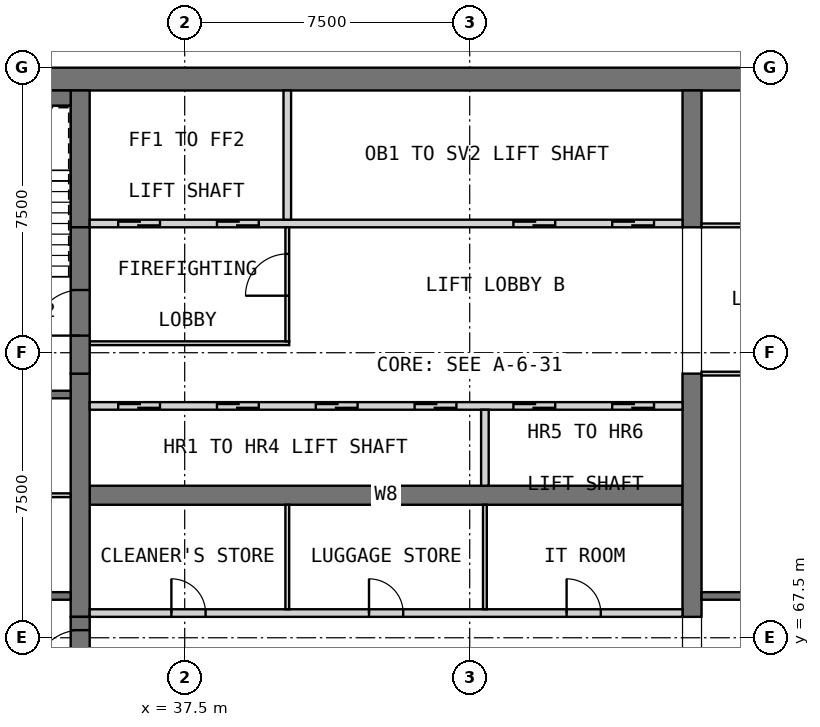
"""IFC4 building model, lengths in metres.
Left out: names, types, materials, properties, quantities, classifications, styles, units other than length and angle.
Written with IfcOpenShell. Run it as: python <this file> out.ifc"""

import sys

from ifc_helpers import new_model, si_unit, direction, frame, frame_2d, origin, place, context, subcontext, project, spatial, rectangle, extrude, element, fill, save


model = new_model("IFC4")
c1 = context("Model", 3, precision=1e-05, world=origin(), true_north=direction((0.0, 1.0)))
c2 = subcontext(c1, "Body", "Model", "MODEL_VIEW")
j1 = project(units=[si_unit("LENGTHUNIT", "METRE"), si_unit("PLANEANGLEUNIT", "RADIAN")], contexts=[c1])
p1 = place(None, origin())
s1 = spatial("IfcSite", under=j1, at=p1, CompositionType="ELEMENT")
p2 = place(p1, origin())
s2 = spatial("IfcBuilding", under=s1, at=p2, CompositionType="ELEMENT")
p3 = place(p2, frame((0.0, 0.0, 226.7)))
s3 = spatial("IfcBuildingStorey", under=s2, at=p3, CompositionType="ELEMENT", Elevation=226.7)
p4 = place(p3, frame((30.0, 82.2, 0.0), z_axis=(0.0, 0.0, 1.0), x_axis=(1.0, 0.0, 0.0)))
e1 = element("IfcWall", 1, at=p4, inside=s3, PredefinedType="SHEAR", context=c2, shape_type="SweptSolid", body=[
    extrude(rectangle(XDim=30.0, YDim=0.6, at=frame_2d((15.0, 0.0))), origin(), (0.0, 0.0, 1.0), 3.5),
])
p5 = place(p3, frame((35.0, 71.25, 0.0), z_axis=(0.0, 0.0, 1.0), x_axis=(1.0, 0.0, 0.0)))
e2 = element("IfcWall", 2, at=p5, inside=s3, PredefinedType="SHEAR", context=c2, shape_type="SweptSolid", body=[
    extrude(rectangle(XDim=15.6, YDim=0.5, at=frame_2d((7.8, 0.0))), origin(), (0.0, 0.0, 1.0), 3.5),
])
p6 = place(p3, frame((34.75, 68.05, 0.0), z_axis=(0.0, 0.0, 1.0), x_axis=(0.0, 1.0, 0.0)))
e3 = element("IfcWall", 3, at=p6, inside=s3, PredefinedType="SHEAR", context=c2, shape_type="SweptSolid", body=[
    extrude(rectangle(XDim=6.4, YDim=0.5, at=frame_2d((3.2, 0.0))), origin(), (0.0, 0.0, 1.0), 3.5),
])
p7 = place(p3, frame((34.75, 78.3, 0.0), z_axis=(0.0, 0.0, 1.0), x_axis=(0.0, 1.0, 0.0)))
e4 = element("IfcWall", 4, at=p7, inside=s3, PredefinedType="SHEAR", context=c2, shape_type="SweptSolid", body=[
    extrude(rectangle(XDim=3.6, YDim=0.5, at=frame_2d((1.8, 0.0))), origin(), (0.0, 0.0, 1.0), 3.5),
])
p8 = place(p3, frame((50.85, 68.05, 0.0), z_axis=(0.0, 0.0, 1.0), x_axis=(0.0, 1.0, 0.0)))
e5 = element("IfcWall", 5, at=p8, inside=s3, PredefinedType="SHEAR", context=c2, shape_type="SweptSolid", body=[
    extrude(rectangle(XDim=6.4, YDim=0.5, at=frame_2d((3.2, 0.0))), origin(), (0.0, 0.0, 1.0), 3.5),
])
p9 = place(p3, frame((50.85, 78.3, 0.0), z_axis=(0.0, 0.0, 1.0), x_axis=(0.0, 1.0, 0.0)))
e6 = element("IfcWall", 6, at=p9, inside=s3, PredefinedType="SHEAR", context=c2, shape_type="SweptSolid", body=[
    extrude(rectangle(XDim=3.6, YDim=0.5, at=frame_2d((1.8, 0.0))), origin(), (0.0, 0.0, 1.0), 3.5),
])
p10 = place(p3, frame((35.0, 68.15, 0.0), z_axis=(0.0, 0.0, 1.0), x_axis=(1.0, 0.0, 0.0)))
e7 = element("IfcWall", 7, at=p10, inside=s3, PredefinedType="PARTITIONING", context=c2, shape_type="SweptSolid", body=[
    extrude(rectangle(XDim=15.6, YDim=0.2, at=frame_2d((7.8, 0.0))), origin(), (0.0, 0.0, 1.0), 3.25),
])
p11 = place(p10, frame((2.15, 0.0, 0.0)))
e8 = element("IfcOpeningElement", 8, at=p11, cuts=e7, PredefinedType="OPENING", context=c2, shape_type="SweptSolid", body=[
    extrude(rectangle(XDim=0.9, YDim=2.1, at=frame_2d((0.45, 1.05))), frame((0.0, 0.11, 0.0), z_axis=(0.0, -1.0, 0.0), x_axis=(1.0, 0.0, 0.0)), (0.0, 0.0, 1.0), 0.22),
])
p12 = place(p10, frame((7.35, 0.0, 0.0)))
e9 = element("IfcOpeningElement", 9, at=p12, cuts=e7, PredefinedType="OPENING", context=c2, shape_type="SweptSolid", body=[
    extrude(rectangle(XDim=0.9, YDim=2.1, at=frame_2d((0.45, 1.05))), frame((0.0, 0.11, 0.0), z_axis=(0.0, -1.0, 0.0), x_axis=(1.0, 0.0, 0.0)), (0.0, 0.0, 1.0), 0.22),
])
p13 = place(p10, frame((12.55, 0.0, 0.0)))
e10 = element("IfcOpeningElement", 10, at=p13, cuts=e7, PredefinedType="OPENING", context=c2, shape_type="SweptSolid", body=[
    extrude(rectangle(XDim=0.9, YDim=2.1, at=frame_2d((0.45, 1.05))), frame((0.0, 0.11, 0.0), z_axis=(0.0, -1.0, 0.0), x_axis=(1.0, 0.0, 0.0)), (0.0, 0.0, 1.0), 0.22),
])
for number, where, z_axis, x_axis in (
    (11, (40.2, 68.25, 0.0), (0.0, 0.0, 1.0), (0.0, 1.0, 0.0)),
    (12, (45.4, 68.25, 0.0), (0.0, 0.0, 1.0), (0.0, 1.0, 0.0)),
):
    element("IfcWall", number, at=place(p3, frame(where, z_axis=z_axis, x_axis=x_axis)), inside=s3, PredefinedType="PARTITIONING", context=c2, shape_type="SweptSolid", body=[
        extrude(rectangle(XDim=2.75, YDim=0.1, at=frame_2d((1.375, 0.0))), origin(), (0.0, 0.0, 1.0), 3.25),
    ])
p14 = place(p3, frame((35.0, 73.6, 0.0), z_axis=(0.0, 0.0, 1.0), x_axis=(1.0, 0.0, 0.0)))
e13 = element("IfcWall", 13, at=p14, inside=s3, PredefinedType="SOLIDWALL", context=c2, shape_type="SweptSolid", body=[
    extrude(rectangle(XDim=15.6, YDim=0.2, at=frame_2d((7.8, 0.0))), origin(), (0.0, 0.0, 1.0), 3.5),
])
p15 = place(p14, frame((0.75, 0.0, 0.0)))
e14 = element("IfcOpeningElement", 14, at=p15, cuts=e13, PredefinedType="OPENING", context=c2, shape_type="SweptSolid", body=[
    extrude(rectangle(XDim=1.1, YDim=2.1, at=frame_2d((0.55, 1.05))), frame((0.0, 0.11, 0.0), z_axis=(0.0, -1.0, 0.0), x_axis=(1.0, 0.0, 0.0)), (0.0, 0.0, 1.0), 0.22),
])
p16 = place(p14, frame((3.35, 0.0, 0.0)))
e15 = element("IfcOpeningElement", 15, at=p16, cuts=e13, PredefinedType="OPENING", context=c2, shape_type="SweptSolid", body=[
    extrude(rectangle(XDim=1.1, YDim=2.1, at=frame_2d((0.55, 1.05))), frame((0.0, 0.11, 0.0), z_axis=(0.0, -1.0, 0.0), x_axis=(1.0, 0.0, 0.0)), (0.0, 0.0, 1.0), 0.22),
])
p17 = place(p14, frame((5.95, 0.0, 0.0)))
e16 = element("IfcOpeningElement", 16, at=p17, cuts=e13, PredefinedType="OPENING", context=c2, shape_type="SweptSolid", body=[
    extrude(rectangle(XDim=1.1, YDim=2.1, at=frame_2d((0.55, 1.05))), frame((0.0, 0.11, 0.0), z_axis=(0.0, -1.0, 0.0), x_axis=(1.0, 0.0, 0.0)), (0.0, 0.0, 1.0), 0.22),
])
p18 = place(p14, frame((8.55, 0.0, 0.0)))
e17 = element("IfcOpeningElement", 17, at=p18, cuts=e13, PredefinedType="OPENING", context=c2, shape_type="SweptSolid", body=[
    extrude(rectangle(XDim=1.1, YDim=2.1, at=frame_2d((0.55, 1.05))), frame((0.0, 0.11, 0.0), z_axis=(0.0, -1.0, 0.0), x_axis=(1.0, 0.0, 0.0)), (0.0, 0.0, 1.0), 0.22),
])
p19 = place(p14, frame((11.15, 0.0, 0.0)))
e18 = element("IfcOpeningElement", 18, at=p19, cuts=e13, PredefinedType="OPENING", context=c2, shape_type="SweptSolid", body=[
    extrude(rectangle(XDim=1.1, YDim=2.1, at=frame_2d((0.55, 1.05))), frame((0.0, 0.11, 0.0), z_axis=(0.0, -1.0, 0.0), x_axis=(1.0, 0.0, 0.0)), (0.0, 0.0, 1.0), 0.22),
])
p20 = place(p14, frame((13.75, 0.0, 0.0)))
e19 = element("IfcOpeningElement", 19, at=p20, cuts=e13, PredefinedType="OPENING", context=c2, shape_type="SweptSolid", body=[
    extrude(rectangle(XDim=1.1, YDim=2.1, at=frame_2d((0.55, 1.05))), frame((0.0, 0.11, 0.0), z_axis=(0.0, -1.0, 0.0), x_axis=(1.0, 0.0, 0.0)), (0.0, 0.0, 1.0), 0.22),
])
p21 = place(p3, frame((45.4, 71.5, 0.0), z_axis=(0.0, 0.0, 1.0), x_axis=(0.0, 1.0, 0.0)))
e20 = element("IfcWall", 20, at=p21, inside=s3, PredefinedType="SOLIDWALL", context=c2, shape_type="SweptSolid", body=[
    extrude(rectangle(XDim=2.0, YDim=0.2, at=frame_2d((1.0, 0.0))), origin(), (0.0, 0.0, 1.0), 3.5),
])
p22 = place(p3, frame((35.0, 78.4, 0.0), z_axis=(0.0, 0.0, 1.0), x_axis=(1.0, 0.0, 0.0)))
e21 = element("IfcWall", 21, at=p22, inside=s3, PredefinedType="SOLIDWALL", context=c2, shape_type="SweptSolid", body=[
    extrude(rectangle(XDim=15.6, YDim=0.2, at=frame_2d((7.8, 0.0))), origin(), (0.0, 0.0, 1.0), 3.5),
])
p23 = place(p22, frame((0.75, 0.0, 0.0)))
e22 = element("IfcOpeningElement", 22, at=p23, cuts=e21, PredefinedType="OPENING", context=c2, shape_type="SweptSolid", body=[
    extrude(rectangle(XDim=1.1, YDim=2.1, at=frame_2d((0.55, 1.05))), frame((0.0, 0.11, 0.0), z_axis=(0.0, -1.0, 0.0), x_axis=(1.0, 0.0, 0.0)), (0.0, 0.0, 1.0), 0.22),
])
p24 = place(p22, frame((3.35, 0.0, 0.0)))
e23 = element("IfcOpeningElement", 23, at=p24, cuts=e21, PredefinedType="OPENING", context=c2, shape_type="SweptSolid", body=[
    extrude(rectangle(XDim=1.1, YDim=2.1, at=frame_2d((0.55, 1.05))), frame((0.0, 0.11, 0.0), z_axis=(0.0, -1.0, 0.0), x_axis=(1.0, 0.0, 0.0)), (0.0, 0.0, 1.0), 0.22),
])
p25 = place(p22, frame((11.15, 0.0, 0.0)))
e24 = element("IfcOpeningElement", 24, at=p25, cuts=e21, PredefinedType="OPENING", context=c2, shape_type="SweptSolid", body=[
    extrude(rectangle(XDim=1.1, YDim=2.1, at=frame_2d((0.55, 1.05))), frame((0.0, 0.11, 0.0), z_axis=(0.0, -1.0, 0.0), x_axis=(1.0, 0.0, 0.0)), (0.0, 0.0, 1.0), 0.22),
])
p26 = place(p22, frame((13.75, 0.0, 0.0)))
e25 = element("IfcOpeningElement", 25, at=p26, cuts=e21, PredefinedType="OPENING", context=c2, shape_type="SweptSolid", body=[
    extrude(rectangle(XDim=1.1, YDim=2.1, at=frame_2d((0.55, 1.05))), frame((0.0, 0.11, 0.0), z_axis=(0.0, -1.0, 0.0), x_axis=(1.0, 0.0, 0.0)), (0.0, 0.0, 1.0), 0.22),
])
p27 = place(p3, frame((40.2, 78.5, 0.0), z_axis=(0.0, 0.0, 1.0), x_axis=(0.0, 1.0, 0.0)))
e26 = element("IfcWall", 26, at=p27, inside=s3, PredefinedType="SOLIDWALL", context=c2, shape_type="SweptSolid", body=[
    extrude(rectangle(XDim=3.4, YDim=0.2, at=frame_2d((1.7, 0.0))), origin(), (0.0, 0.0, 1.0), 3.5),
])
p28 = place(p3, frame((35.0, 75.25, 0.0), z_axis=(0.0, 0.0, 1.0), x_axis=(1.0, 0.0, 0.0)))
e27 = element("IfcWall", 27, at=p28, inside=s3, PredefinedType="PARTITIONING", context=c2, shape_type="SweptSolid", body=[
    extrude(rectangle(XDim=5.25, YDim=0.1, at=frame_2d((2.625, 0.0))), origin(), (0.0, 0.0, 1.0), 3.25),
])
p29 = place(p3, frame((40.2, 75.3, 0.0), z_axis=(0.0, 0.0, 1.0), x_axis=(0.0, 1.0, 0.0)))
e28 = element("IfcWall", 28, at=p29, inside=s3, PredefinedType="PARTITIONING", context=c2, shape_type="SweptSolid", body=[
    extrude(rectangle(XDim=3.0, YDim=0.1, at=frame_2d((1.5, 0.0))), origin(), (0.0, 0.0, 1.0), 3.25),
])
p30 = place(p29, frame((1.2, 0.0, 0.0)))
e29 = element("IfcOpeningElement", 29, at=p30, cuts=e28, PredefinedType="OPENING", context=c2, shape_type="SweptSolid", body=[
    extrude(rectangle(XDim=1.1, YDim=2.1, at=frame_2d((0.55, 1.05))), frame((0.0, 0.06, 0.0), z_axis=(0.0, -1.0, 0.0), x_axis=(1.0, 0.0, 0.0)), (0.0, 0.0, 1.0), 0.12),
])
p31 = place(p3, frame((34.75, 64.2, 0.0), z_axis=(0.0, 0.0, 1.0), x_axis=(0.0, 1.0, 0.0)))
e30 = element("IfcWall", 30, at=p31, inside=s3, PredefinedType="SOLIDWALL", context=c2, shape_type="SweptSolid", body=[
    extrude(rectangle(XDim=3.85, YDim=0.5, at=frame_2d((1.925, 0.0))), origin(), (0.0, 0.0, 1.0), 2.3),
])
p32 = place(p31, frame((2.3, 0.0, 0.0)))
e31 = element("IfcOpeningElement", 31, at=p32, cuts=e30, PredefinedType="OPENING", context=c2, shape_type="SweptSolid", body=[
    extrude(rectangle(XDim=1.2, YDim=2.1, at=frame_2d((0.6, 1.05))), frame((0.0, 0.26, 0.0), z_axis=(0.0, -1.0, 0.0), x_axis=(1.0, 0.0, 0.0)), (0.0, 0.0, 1.0), 0.52),
])
p33 = place(p3, frame((34.75, 74.45, 0.0), z_axis=(0.0, 0.0, 1.0), x_axis=(0.0, 1.0, 0.0)))
e32 = element("IfcWall", 32, at=p33, inside=s3, PredefinedType="SOLIDWALL", context=c2, shape_type="SweptSolid", body=[
    extrude(rectangle(XDim=3.85, YDim=0.5, at=frame_2d((1.925, 0.0))), origin(), (0.0, 0.0, 1.0), 2.3),
])
p34 = place(p33, frame((1.0, 0.0, 0.0)))
e33 = element("IfcOpeningElement", 33, at=p34, cuts=e32, PredefinedType="OPENING", context=c2, shape_type="SweptSolid", body=[
    extrude(rectangle(XDim=1.2, YDim=2.1, at=frame_2d((0.6, 1.05))), frame((0.0, 0.26, 0.0), z_axis=(0.0, -1.0, 0.0), x_axis=(1.0, 0.0, 0.0)), (0.0, 0.0, 1.0), 0.52),
])
p35 = place(p3, frame((30.6, 68.6, 0.0), z_axis=(0.0, 0.0, 1.0), x_axis=(1.0, 0.0, 0.0)))
e34 = element("IfcWall", 34, at=p35, inside=s3, PredefinedType="SOLIDWALL", context=c2, shape_type="SweptSolid", body=[
    extrude(rectangle(XDim=3.9, YDim=0.2, at=frame_2d((1.95, 0.0))), origin(), (0.0, 0.0, 1.0), 3.25),
])
p36 = place(p35, frame((1.7, 0.0, 0.0)))
e35 = element("IfcOpeningElement", 35, at=p36, cuts=e34, PredefinedType="OPENING", context=c2, shape_type="SweptSolid", body=[
    extrude(rectangle(XDim=0.9, YDim=2.1, at=frame_2d((0.45, 1.05))), frame((0.0, 0.11, 0.0), z_axis=(0.0, -1.0, 0.0), x_axis=(1.0, 0.0, 0.0)), (0.0, 0.0, 1.0), 0.22),
])
p37 = place(p3, frame((30.6, 73.9, 0.0), z_axis=(0.0, 0.0, 1.0), x_axis=(1.0, 0.0, 0.0)))
e36 = element("IfcWall", 36, at=p37, inside=s3, PredefinedType="SOLIDWALL", context=c2, shape_type="SweptSolid", body=[
    extrude(rectangle(XDim=3.9, YDim=0.2, at=frame_2d((1.95, 0.0))), origin(), (0.0, 0.0, 1.0), 3.25),
])
p38 = place(p37, frame((1.7, 0.0, 0.0)))
e37 = element("IfcOpeningElement", 37, at=p38, cuts=e36, PredefinedType="OPENING", context=c2, shape_type="SweptSolid", body=[
    extrude(rectangle(XDim=0.9, YDim=2.1, at=frame_2d((0.45, 1.05))), frame((0.0, 0.11, 0.0), z_axis=(0.0, -1.0, 0.0), x_axis=(1.0, 0.0, 0.0)), (0.0, 0.0, 1.0), 0.22),
])
p39 = place(p3, frame((51.1, 68.6, 0.0), z_axis=(0.0, 0.0, 1.0), x_axis=(1.0, 0.0, 0.0)))
e38 = element("IfcWall", 38, at=p39, inside=s3, PredefinedType="SOLIDWALL", context=c2, shape_type="SweptSolid", body=[
    extrude(rectangle(XDim=8.3, YDim=0.2, at=frame_2d((4.15, 0.0))), origin(), (0.0, 0.0, 1.0), 3.25),
])
p40 = place(p3, frame((31.0, 81.7, 0.0), z_axis=(0.0, 0.0, 1.0), x_axis=(1.0, 0.0, 0.0)))
e39 = element("IfcWall", 39, at=p40, inside=s3, PredefinedType="SOLIDWALL", context=c2, shape_type="SweptSolid", body=[
    extrude(rectangle(XDim=3.5, YDim=0.4, at=frame_2d((1.75, 0.0))), origin(), (0.0, 0.0, 1.0), 3.25),
])
p41 = place(p3, frame((30.6, 71.25, 0.0), z_axis=(0.0, 0.0, 1.0), x_axis=(1.0, 0.0, 0.0)))
e40 = element("IfcWall", 40, at=p41, inside=s3, PredefinedType="PARTITIONING", context=c2, shape_type="SweptSolid", body=[
    extrude(rectangle(XDim=3.9, YDim=0.1, at=frame_2d((1.95, 0.0))), origin(), (0.0, 0.0, 1.0), 3.25),
])
p42 = place(p3, frame((51.1, 74.45, 0.0), z_axis=(0.0, 0.0, 1.0), x_axis=(1.0, 0.0, 0.0)))
e41 = element("IfcWall", 41, at=p42, inside=s3, PredefinedType="PARTITIONING", context=c2, shape_type="SweptSolid", body=[
    extrude(rectangle(XDim=8.3, YDim=0.1, at=frame_2d((4.15, 0.0))), origin(), (0.0, 0.0, 1.0), 3.25),
])
p43 = place(p42, frame((3.7, 0.0, 0.0)))
e42 = element("IfcOpeningElement", 42, at=p43, cuts=e41, PredefinedType="OPENING", context=c2, shape_type="SweptSolid", body=[
    extrude(rectangle(XDim=0.9, YDim=2.1, at=frame_2d((0.45, 1.05))), frame((0.0, 0.06, 0.0), z_axis=(0.0, -1.0, 0.0), x_axis=(1.0, 0.0, 0.0)), (0.0, 0.0, 1.0), 0.12),
])
p44 = place(p3, frame((51.1, 78.35, 0.0), z_axis=(0.0, 0.0, 1.0), x_axis=(1.0, 0.0, 0.0)))
e43 = element("IfcWall", 43, at=p44, inside=s3, PredefinedType="PARTITIONING", context=c2, shape_type="SweptSolid", body=[
    extrude(rectangle(XDim=8.3, YDim=0.1, at=frame_2d((4.15, 0.0))), origin(), (0.0, 0.0, 1.0), 3.25),
])
p45 = place(p44, frame((3.7, 0.0, 0.0)))
e44 = element("IfcOpeningElement", 44, at=p45, cuts=e43, PredefinedType="OPENING", context=c2, shape_type="SweptSolid", body=[
    extrude(rectangle(XDim=0.9, YDim=2.1, at=frame_2d((0.45, 1.05))), frame((0.0, 0.06, 0.0), z_axis=(0.0, -1.0, 0.0), x_axis=(1.0, 0.0, 0.0)), (0.0, 0.0, 1.0), 0.12),
])
p46 = place(p11, origin())
e45 = element("IfcDoor", 45, at=p46, inside=s3, OperationType="SINGLE_SWING_RIGHT", PredefinedType="DOOR", context=c2, shape_type="SweptSolid", body=[
    extrude(rectangle(XDim=0.9, YDim=2.1, at=frame_2d((0.45, 1.05))), frame((0.0, 0.025, 0.0), z_axis=(0.0, -1.0, 0.0), x_axis=(1.0, 0.0, 0.0)), (0.0, 0.0, 1.0), 0.05),
])
fill(e8, e45)
p47 = place(p12, origin())
e46 = element("IfcDoor", 46, at=p47, inside=s3, OperationType="SINGLE_SWING_LEFT", PredefinedType="DOOR", context=c2, shape_type="SweptSolid", body=[
    extrude(rectangle(XDim=0.9, YDim=2.1, at=frame_2d((0.45, 1.05))), frame((0.0, 0.025, 0.0), z_axis=(0.0, -1.0, 0.0), x_axis=(1.0, 0.0, 0.0)), (0.0, 0.0, 1.0), 0.05),
])
fill(e9, e46)
p48 = place(p13, origin())
e47 = element("IfcDoor", 47, at=p48, inside=s3, OperationType="SINGLE_SWING_RIGHT", PredefinedType="DOOR", context=c2, shape_type="SweptSolid", body=[
    extrude(rectangle(XDim=0.9, YDim=2.1, at=frame_2d((0.45, 1.05))), frame((0.0, 0.025, 0.0), z_axis=(0.0, -1.0, 0.0), x_axis=(1.0, 0.0, 0.0)), (0.0, 0.0, 1.0), 0.05),
])
fill(e10, e47)
p49 = place(p15, origin())
e48 = element("IfcDoor", 48, at=p49, inside=s3, OperationType="DOUBLE_DOOR_SLIDING", PredefinedType="DOOR", context=c2, shape_type="SweptSolid", body=[
    extrude(rectangle(XDim=1.1, YDim=2.1, at=frame_2d((0.55, 1.05))), frame((0.0, 0.025, 0.0), z_axis=(0.0, -1.0, 0.0), x_axis=(1.0, 0.0, 0.0)), (0.0, 0.0, 1.0), 0.05),
])
fill(e14, e48)
p50 = place(p16, origin())
e49 = element("IfcDoor", 49, at=p50, inside=s3, OperationType="DOUBLE_DOOR_SLIDING", PredefinedType="DOOR", context=c2, shape_type="SweptSolid", body=[
    extrude(rectangle(XDim=1.1, YDim=2.1, at=frame_2d((0.55, 1.05))), frame((0.0, 0.025, 0.0), z_axis=(0.0, -1.0, 0.0), x_axis=(1.0, 0.0, 0.0)), (0.0, 0.0, 1.0), 0.05),
])
fill(e15, e49)
p51 = place(p17, origin())
e50 = element("IfcDoor", 50, at=p51, inside=s3, OperationType="DOUBLE_DOOR_SLIDING", PredefinedType="DOOR", context=c2, shape_type="SweptSolid", body=[
    extrude(rectangle(XDim=1.1, YDim=2.1, at=frame_2d((0.55, 1.05))), frame((0.0, 0.025, 0.0), z_axis=(0.0, -1.0, 0.0), x_axis=(1.0, 0.0, 0.0)), (0.0, 0.0, 1.0), 0.05),
])
fill(e16, e50)
p52 = place(p18, origin())
e51 = element("IfcDoor", 51, at=p52, inside=s3, OperationType="DOUBLE_DOOR_SLIDING", PredefinedType="DOOR", context=c2, shape_type="SweptSolid", body=[
    extrude(rectangle(XDim=1.1, YDim=2.1, at=frame_2d((0.55, 1.05))), frame((0.0, 0.025, 0.0), z_axis=(0.0, -1.0, 0.0), x_axis=(1.0, 0.0, 0.0)), (0.0, 0.0, 1.0), 0.05),
])
fill(e17, e51)
p53 = place(p19, origin())
e52 = element("IfcDoor", 52, at=p53, inside=s3, OperationType="DOUBLE_DOOR_SLIDING", PredefinedType="DOOR", context=c2, shape_type="SweptSolid", body=[
    extrude(rectangle(XDim=1.1, YDim=2.1, at=frame_2d((0.55, 1.05))), frame((0.0, 0.025, 0.0), z_axis=(0.0, -1.0, 0.0), x_axis=(1.0, 0.0, 0.0)), (0.0, 0.0, 1.0), 0.05),
])
fill(e18, e52)
p54 = place(p20, origin())
e53 = element("IfcDoor", 53, at=p54, inside=s3, OperationType="DOUBLE_DOOR_SLIDING", PredefinedType="DOOR", context=c2, shape_type="SweptSolid", body=[
    extrude(rectangle(XDim=1.1, YDim=2.1, at=frame_2d((0.55, 1.05))), frame((0.0, 0.025, 0.0), z_axis=(0.0, -1.0, 0.0), x_axis=(1.0, 0.0, 0.0)), (0.0, 0.0, 1.0), 0.05),
])
fill(e19, e53)
p55 = place(p23, origin())
e54 = element("IfcDoor", 54, at=p55, inside=s3, OperationType="DOUBLE_DOOR_SLIDING", PredefinedType="DOOR", context=c2, shape_type="SweptSolid", body=[
    extrude(rectangle(XDim=1.1, YDim=2.1, at=frame_2d((0.55, 1.05))), frame((0.0, 0.025, 0.0), z_axis=(0.0, -1.0, 0.0), x_axis=(1.0, 0.0, 0.0)), (0.0, 0.0, 1.0), 0.05),
])
fill(e22, e54)
p56 = place(p24, origin())
e55 = element("IfcDoor", 55, at=p56, inside=s3, OperationType="DOUBLE_DOOR_SLIDING", PredefinedType="DOOR", context=c2, shape_type="SweptSolid", body=[
    extrude(rectangle(XDim=1.1, YDim=2.1, at=frame_2d((0.55, 1.05))), frame((0.0, 0.025, 0.0), z_axis=(0.0, -1.0, 0.0), x_axis=(1.0, 0.0, 0.0)), (0.0, 0.0, 1.0), 0.05),
])
fill(e23, e55)
p57 = place(p25, origin())
e56 = element("IfcDoor", 56, at=p57, inside=s3, OperationType="DOUBLE_DOOR_SLIDING", PredefinedType="DOOR", context=c2, shape_type="SweptSolid", body=[
    extrude(rectangle(XDim=1.1, YDim=2.1, at=frame_2d((0.55, 1.05))), frame((0.0, 0.025, 0.0), z_axis=(0.0, -1.0, 0.0), x_axis=(1.0, 0.0, 0.0)), (0.0, 0.0, 1.0), 0.05),
])
fill(e24, e56)
p58 = place(p26, origin())
e57 = element("IfcDoor", 57, at=p58, inside=s3, OperationType="DOUBLE_DOOR_SLIDING", PredefinedType="DOOR", context=c2, shape_type="SweptSolid", body=[
    extrude(rectangle(XDim=1.1, YDim=2.1, at=frame_2d((0.55, 1.05))), frame((0.0, 0.025, 0.0), z_axis=(0.0, -1.0, 0.0), x_axis=(1.0, 0.0, 0.0)), (0.0, 0.0, 1.0), 0.05),
])
fill(e25, e57)
p59 = place(p30, origin())
e58 = element("IfcDoor", 58, at=p59, inside=s3, OperationType="SINGLE_SWING_LEFT", PredefinedType="DOOR", context=c2, shape_type="SweptSolid", body=[
    extrude(rectangle(XDim=1.1, YDim=2.1, at=frame_2d((0.55, 1.05))), frame((0.0, 0.025, 0.0), z_axis=(0.0, -1.0, 0.0), x_axis=(1.0, 0.0, 0.0)), (0.0, 0.0, 1.0), 0.05),
])
fill(e29, e58)
p60 = place(p32, origin())
e59 = element("IfcDoor", 59, at=p60, inside=s3, OperationType="SINGLE_SWING_LEFT", PredefinedType="DOOR", context=c2, shape_type="SweptSolid", body=[
    extrude(rectangle(XDim=1.2, YDim=2.1, at=frame_2d((0.6, 1.05))), frame((0.0, 0.025, 0.0), z_axis=(0.0, -1.0, 0.0), x_axis=(1.0, 0.0, 0.0)), (0.0, 0.0, 1.0), 0.05),
])
fill(e31, e59)
p61 = place(p34, origin())
e60 = element("IfcDoor", 60, at=p61, inside=s3, OperationType="SINGLE_SWING_RIGHT", PredefinedType="DOOR", context=c2, shape_type="SweptSolid", body=[
    extrude(rectangle(XDim=1.2, YDim=2.1, at=frame_2d((0.6, 1.05))), frame((0.0, 0.025, 0.0), z_axis=(0.0, -1.0, 0.0), x_axis=(1.0, 0.0, 0.0)), (0.0, 0.0, 1.0), 0.05),
])
fill(e33, e60)
save(model, sys.argv[1])
